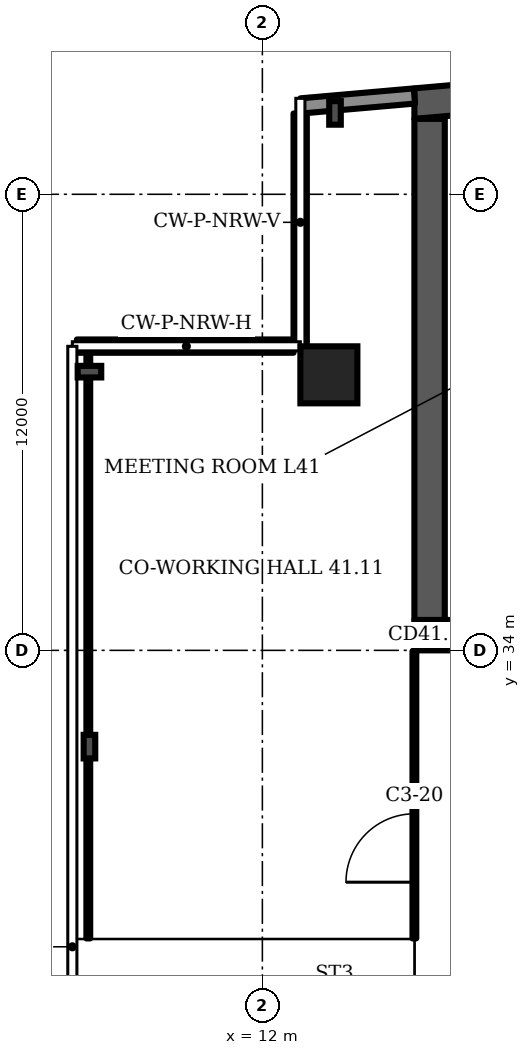
"""IFC4 building model, lengths in metres.
Left out: names, types, materials, properties, quantities, classifications, styles, units other than length and angle.
Written with IfcOpenShell. Run it as: python <this file> out.ifc"""

import sys

from ifc_helpers import new_model, si_unit, direction, frame, frame_2d, origin, origin_2d, place, context, subcontext, project, spatial, polyline, rectangle, i_section, outline, extrude, element, fill, save


model = new_model("IFC4")
c1 = context("Model", 3, precision=1e-05, world=origin(), true_north=direction((0.0, 1.0)))
c2 = subcontext(c1, "Body", "Model", "MODEL_VIEW")
j1 = project(units=[si_unit("LENGTHUNIT", "METRE"), si_unit("PLANEANGLEUNIT", "RADIAN")], contexts=[c1])
p1 = place(None, origin())
s1 = spatial("IfcSite", under=j1, at=p1, CompositionType="ELEMENT")
p2 = place(p1, origin())
s2 = spatial("IfcBuilding", under=s1, at=p2, CompositionType="ELEMENT")
p3 = place(p2, frame((0.0, 0.0, 169.9)))
s3 = spatial("IfcBuildingStorey", under=s2, at=p3, CompositionType="ELEMENT", Elevation=169.9)
p4 = place(p3, origin())
e1 = element("IfcWall", 1, at=p4, inside=s3, PredefinedType="SHEAR", context=c2, shape_type="SweptSolid", body=[
    extrude(outline(polyline([(16.0, 47.984), (37.0, 49.822), (58.0, 47.984), (58.0, 48.787), (37.0, 50.625), (16.0, 48.787), (16.0, 47.984)])), origin(), (0.0, 0.0, 1.0), 3.6),
])
p5 = place(p3, frame((16.0, 34.4, 0.0), z_axis=(0.0, 0.0, 1.0), x_axis=(1.0, 0.0, 0.0)))
e2 = element("IfcWall", 2, at=p5, inside=s3, PredefinedType="SHEAR", context=c2, shape_type="SweptSolid", body=[
    extrude(rectangle(XDim=42.0, YDim=0.8, at=frame_2d((21.0, 0.0))), origin(), (0.0, 0.0, 1.0), 3.6),
])
p6 = place(p5, frame((1.75, 0.0, 0.0)))
e3 = element("IfcOpeningElement", 3, at=p6, cuts=e2, PredefinedType="OPENING", context=c2, shape_type="SweptSolid", body=[
    extrude(rectangle(XDim=1.0, YDim=2.1, at=frame_2d((0.5, 1.05))), frame((0.0, 0.41, 0.0), z_axis=(0.0, -1.0, 0.0), x_axis=(1.0, 0.0, 0.0)), (0.0, 0.0, 1.0), 0.82),
])
p7 = place(p5, frame((4.65, 0.0, 0.0)))
e4 = element("IfcOpeningElement", 4, at=p7, cuts=e2, PredefinedType="OPENING", context=c2, shape_type="SweptSolid", body=[
    extrude(rectangle(XDim=1.0, YDim=2.1, at=frame_2d((0.5, 1.05))), frame((0.0, 0.41, 0.0), z_axis=(0.0, -1.0, 0.0), x_axis=(1.0, 0.0, 0.0)), (0.0, 0.0, 1.0), 0.82),
])
p8 = place(p5, frame((7.65, 0.0, 0.0)))
e5 = element("IfcOpeningElement", 5, at=p8, cuts=e2, PredefinedType="OPENING", context=c2, shape_type="SweptSolid", body=[
    extrude(rectangle(XDim=1.2, YDim=2.1, at=frame_2d((0.6, 1.05))), frame((0.0, 0.41, 0.0), z_axis=(0.0, -1.0, 0.0), x_axis=(1.0, 0.0, 0.0)), (0.0, 0.0, 1.0), 0.82),
])
p9 = place(p5, frame((14.767, 0.0, 0.0)))
e6 = element("IfcOpeningElement", 6, at=p9, cuts=e2, PredefinedType="OPENING", context=c2, shape_type="SweptSolid", body=[
    extrude(rectangle(XDim=1.1, YDim=2.1, at=frame_2d((0.55, 1.05))), frame((0.0, 0.41, 0.0), z_axis=(0.0, -1.0, 0.0), x_axis=(1.0, 0.0, 0.0)), (0.0, 0.0, 1.0), 0.82),
])
p10 = place(p5, frame((19.133, 0.0, 0.0)))
e7 = element("IfcOpeningElement", 7, at=p10, cuts=e2, PredefinedType="OPENING", context=c2, shape_type="SweptSolid", body=[
    extrude(rectangle(XDim=1.1, YDim=2.1, at=frame_2d((0.55, 1.05))), frame((0.0, 0.41, 0.0), z_axis=(0.0, -1.0, 0.0), x_axis=(1.0, 0.0, 0.0)), (0.0, 0.0, 1.0), 0.82),
])
p11 = place(p5, frame((16.8, 0.0, 0.0)))
e8 = element("IfcOpeningElement", 8, at=p11, cuts=e2, PredefinedType="OPENING", context=c2, shape_type="SweptSolid", body=[
    extrude(rectangle(XDim=1.4, YDim=2.1, at=frame_2d((0.7, 1.05))), frame((0.0, 0.41, 0.0), z_axis=(0.0, -1.0, 0.0), x_axis=(1.0, 0.0, 0.0)), (0.0, 0.0, 1.0), 0.82),
])
p12 = place(p5, frame((21.767, 0.0, 0.0)))
e9 = element("IfcOpeningElement", 9, at=p12, cuts=e2, PredefinedType="OPENING", context=c2, shape_type="SweptSolid", body=[
    extrude(rectangle(XDim=1.1, YDim=2.1, at=frame_2d((0.55, 1.05))), frame((0.0, 0.41, 0.0), z_axis=(0.0, -1.0, 0.0), x_axis=(1.0, 0.0, 0.0)), (0.0, 0.0, 1.0), 0.82),
])
p13 = place(p5, frame((23.95, 0.0, 0.0)))
e10 = element("IfcOpeningElement", 10, at=p13, cuts=e2, PredefinedType="OPENING", context=c2, shape_type="SweptSolid", body=[
    extrude(rectangle(XDim=1.1, YDim=2.1, at=frame_2d((0.55, 1.05))), frame((0.0, 0.41, 0.0), z_axis=(0.0, -1.0, 0.0), x_axis=(1.0, 0.0, 0.0)), (0.0, 0.0, 1.0), 0.82),
])
p14 = place(p5, frame((26.133, 0.0, 0.0)))
e11 = element("IfcOpeningElement", 11, at=p14, cuts=e2, PredefinedType="OPENING", context=c2, shape_type="SweptSolid", body=[
    extrude(rectangle(XDim=1.1, YDim=2.1, at=frame_2d((0.55, 1.05))), frame((0.0, 0.41, 0.0), z_axis=(0.0, -1.0, 0.0), x_axis=(1.0, 0.0, 0.0)), (0.0, 0.0, 1.0), 0.82),
])
p15 = place(p5, frame((33.15, 0.0, 0.0)))
e12 = element("IfcOpeningElement", 12, at=p15, cuts=e2, PredefinedType="OPENING", context=c2, shape_type="SweptSolid", body=[
    extrude(rectangle(XDim=1.2, YDim=2.1, at=frame_2d((0.6, 1.05))), frame((0.0, 0.41, 0.0), z_axis=(0.0, -1.0, 0.0), x_axis=(1.0, 0.0, 0.0)), (0.0, 0.0, 1.0), 0.82),
])
p16 = place(p5, frame((37.767, 0.0, 0.0)))
e13 = element("IfcOpeningElement", 13, at=p16, cuts=e2, PredefinedType="OPENING", context=c2, shape_type="SweptSolid", body=[
    extrude(rectangle(XDim=1.4, YDim=2.1, at=frame_2d((0.7, 1.05))), frame((0.0, 0.41, 0.0), z_axis=(0.0, -1.0, 0.0), x_axis=(1.0, 0.0, 0.0)), (0.0, 0.0, 1.0), 0.82),
])
p17 = place(p3, frame((16.4, 34.8, 0.0), z_axis=(0.0, 0.0, 1.0), x_axis=(0.0, 1.0, 0.0)))
e14 = element("IfcWall", 14, at=p17, inside=s3, PredefinedType="SHEAR", context=c2, shape_type="SweptSolid", body=[
    extrude(rectangle(XDim=13.184, YDim=0.8, at=frame_2d((6.592, 0.0))), origin(), (0.0, 0.0, 1.0), 3.6),
])
p18 = place(p3, frame((13.75, 41.25, 0.0), z_axis=(0.0, 0.0, 1.0), x_axis=(1.0, 0.0, 0.0)))
e15 = element("IfcColumn", 15, at=p18, inside=s3, PredefinedType="COLUMN", context=c2, shape_type="SweptSolid", body=[
    extrude(rectangle(XDim=1.5, YDim=1.5, at=origin_2d()), origin(), (0.0, 0.0, 1.0), 3.6),
])
for number, where, z_axis, x_axis in (
    (16, (13.911, 48.141, 0.0), (0.0, 0.0, 1.0), (-1.0, 0.0, 0.0)),
    (17, (7.45, 41.333, 0.0), (0.0, 0.0, 1.0), (0.0, 1.0, 0.0)),
    (18, (7.45, 31.467, 0.0), (0.0, 0.0, 1.0), (-1.0, 0.0, 0.0)),
):
    element("IfcColumn", number, at=place(p3, frame(where, z_axis=z_axis, x_axis=x_axis)), inside=s3, PredefinedType="COLUMN", context=c2, shape_type="SweptSolid", body=[
        extrude(i_section(OverallWidth=0.305, OverallDepth=0.62, WebThickness=0.021, FlangeThickness=0.04, FilletRadius=0.027, at=origin_2d()), origin(), (0.0, 0.0, 1.0), 3.6),
    ])
p19 = place(p3, frame((16.0, 48.587, 0.0), z_axis=(0.0, 0.0, 1.0), x_axis=(-0.996194, -0.087168, 0.0)))
e19 = element("IfcWall", 19, at=p19, inside=s3, PredefinedType="SOLIDWALL", context=c2, shape_type="SweptSolid", body=[
    extrude(rectangle(XDim=2.994, YDim=0.4, at=frame_2d((1.497, 0.0))), origin(), (0.0, 0.0, 1.0), 3.2),
])
p20 = place(p3, frame((12.995, 48.126, 0.0), z_axis=(0.0, 0.0, 1.0), x_axis=(0.0, -1.0, 0.0)))
e20 = element("IfcWall", 20, at=p20, inside=s3, PredefinedType="SOLIDWALL", context=c2, shape_type="SweptSolid", body=[
    extrude(rectangle(XDim=6.126, YDim=0.35, at=frame_2d((3.063, 0.0))), origin(), (0.0, 0.0, 1.0), 1.0),
])
p21 = place(p3, frame((12.82, 42.005, 0.0), z_axis=(0.0, 0.0, 1.0), x_axis=(-1.0, 0.0, 0.0)))
e21 = element("IfcWall", 21, at=p21, inside=s3, PredefinedType="SOLIDWALL", context=c2, shape_type="SweptSolid", body=[
    extrude(rectangle(XDim=5.7, YDim=0.35, at=frame_2d((2.85, 0.0))), origin(), (0.0, 0.0, 1.0), 1.0),
])
p22 = place(p3, frame((7.42, 26.42, 0.0), z_axis=(0.0, 0.0, 1.0), x_axis=(0.0, 1.0, 0.0)))
e22 = element("IfcWall", 22, at=p22, inside=s3, PredefinedType="PARTITIONING", context=c2, shape_type="SweptSolid", body=[
    extrude(rectangle(XDim=15.56, YDim=0.1, at=frame_2d((7.78, 0.0))), origin(), (0.0, 0.0, 1.0), 2.58),
])
p23 = place(p3, frame((16.0, 26.42, 0.0), z_axis=(0.0, 0.0, 1.0), x_axis=(0.0, 1.0, 0.0)))
e23 = element("IfcWall", 23, at=p23, inside=s3, PredefinedType="PARTITIONING", context=c2, shape_type="SweptSolid", body=[
    extrude(rectangle(XDim=7.56, YDim=0.1, at=frame_2d((3.78, 0.0))), origin(), (0.0, 0.0, 1.0), 3.2),
])
p24 = place(p23, frame((1.48, 0.0, 0.0)))
e24 = element("IfcOpeningElement", 24, at=p24, cuts=e23, PredefinedType="OPENING", context=c2, shape_type="SweptSolid", body=[
    extrude(rectangle(XDim=1.8, YDim=2.1, at=frame_2d((0.9, 1.05))), frame((0.0, 0.06, 0.0), z_axis=(0.0, -1.0, 0.0), x_axis=(1.0, 0.0, 0.0)), (0.0, 0.0, 1.0), 0.12),
])
p25 = place(p24, origin())
e25 = element("IfcDoor", 25, at=p25, inside=s3, OperationType="DOUBLE_DOOR_SINGLE_SWING", PredefinedType="DOOR", context=c2, shape_type="SweptSolid", body=[
    extrude(rectangle(XDim=1.8, YDim=2.1, at=frame_2d((0.9, 1.05))), frame((0.0, 0.025, 0.0), z_axis=(0.0, -1.0, 0.0), x_axis=(1.0, 0.0, 0.0)), (0.0, 0.0, 1.0), 0.05),
])
fill(e24, e25)
save(model, sys.argv[1])
